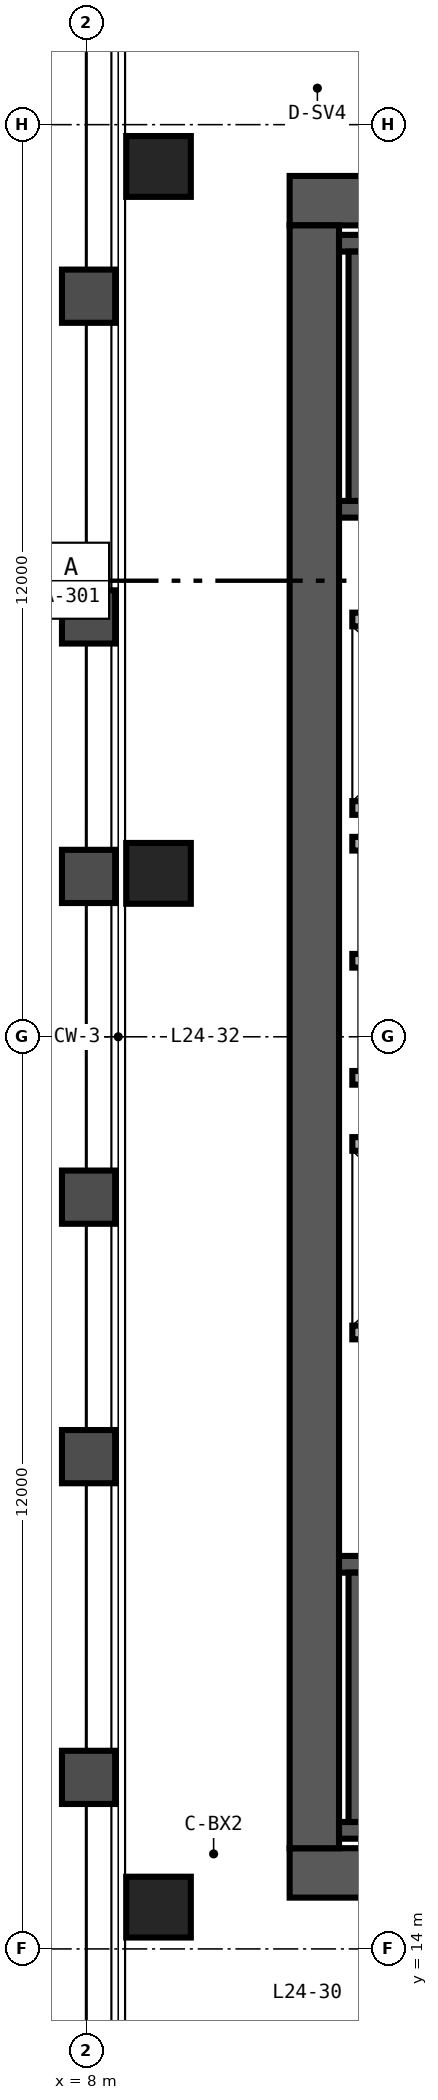
"""IFC4 building model, lengths in metres.
Left out: names, types, materials, properties, quantities, classifications, styles, units other than length and angle.
Written with IfcOpenShell. Run it as: python <this file> out.ifc"""

import sys

from ifc_helpers import new_model, si_unit, direction, frame, frame_2d, origin, origin_2d, place, context, subcontext, project, spatial, rectangle, hollow_rectangle, extrude, source, transform, mapped, element, save


model = new_model("IFC4")
c1 = context("Model", 3, precision=1e-05, world=origin(), true_north=direction((0.0, 1.0)))
c2 = subcontext(c1, "Body", "Model", "MODEL_VIEW")
j1 = project(units=[si_unit("LENGTHUNIT", "METRE"), si_unit("PLANEANGLEUNIT", "RADIAN")], contexts=[c1])
p1 = place(None, origin())
s1 = spatial("IfcSite", under=j1, at=p1, CompositionType="ELEMENT")
p2 = place(p1, origin())
s2 = spatial("IfcBuilding", under=s1, at=p2, CompositionType="ELEMENT")
p3 = place(p2, frame((0.0, 0.0, 100.8)))
s3 = spatial("IfcBuildingStorey", under=s2, at=p3, CompositionType="ELEMENT", Elevation=100.8)
p4 = place(p3, frame((10.675, 15.0, 0.0), z_axis=(0.0, 0.0, 1.0), x_axis=(1.0, 0.0, 0.0)))
e1 = element("IfcWall", 1, at=p4, inside=s3, PredefinedType="SHEAR", context=c2, shape_type="SweptSolid", body=[
    extrude(rectangle(XDim=12.65, YDim=0.65, at=frame_2d((6.325, 0.0))), origin(), (0.0, 0.0, 1.0), 3.36),
])
p5 = place(p4, frame((10.225, 0.0, 0.0)))
e2 = element("IfcOpeningElement", 2, at=p5, cuts=e1, PredefinedType="OPENING", context=c2, shape_type="SweptSolid", body=[
    extrude(rectangle(XDim=1.0, YDim=2.15, at=frame_2d((0.5, 1.075))), frame((0.0, 0.335, 0.0), z_axis=(0.0, -1.0, 0.0), x_axis=(1.0, 0.0, 0.0)), (0.0, 0.0, 1.0), 0.67),
])
p6 = place(p3, frame((10.675, 37.0, 0.0), z_axis=(0.0, 0.0, 1.0), x_axis=(1.0, 0.0, 0.0)))
e3 = element("IfcWall", 3, at=p6, inside=s3, PredefinedType="SHEAR", context=c2, shape_type="SweptSolid", body=[
    extrude(rectangle(XDim=12.65, YDim=0.65, at=frame_2d((6.325, 0.0))), origin(), (0.0, 0.0, 1.0), 3.36),
])
p7 = place(p6, frame((10.425, 0.0, 0.0)))
e4 = element("IfcOpeningElement", 4, at=p7, cuts=e3, PredefinedType="OPENING", context=c2, shape_type="SweptSolid", body=[
    extrude(rectangle(XDim=1.0, YDim=2.15, at=frame_2d((0.5, 1.075))), frame((0.0, 0.335, 0.0), z_axis=(0.0, -1.0, 0.0), x_axis=(1.0, 0.0, 0.0)), (0.0, 0.0, 1.0), 0.67),
])
p8 = place(p3, frame((11.0, 15.325, 0.0), z_axis=(0.0, 0.0, 1.0), x_axis=(0.0, 1.0, 0.0)))
e5 = element("IfcWall", 5, at=p8, inside=s3, PredefinedType="SHEAR", context=c2, shape_type="SweptSolid", body=[
    extrude(rectangle(XDim=21.35, YDim=0.65, at=frame_2d((10.675, 0.0))), origin(), (0.0, 0.0, 1.0), 3.36),
])
p9 = place(p3, frame((11.325, 15.56, 0.0), z_axis=(0.0, 0.0, 1.0), x_axis=(1.0, 0.0, 0.0)))
e6 = element("IfcWall", 6, at=p9, inside=s3, PredefinedType="SHEAR", context=c2, shape_type="SweptSolid", body=[
    extrude(rectangle(XDim=7.985, YDim=0.22, at=frame_2d((3.993, 0.0))), origin(), (0.0, 0.0, 1.0), 3.4),
])
p10 = place(p3, frame((11.325, 19.06, 0.0), z_axis=(0.0, 0.0, 1.0), x_axis=(1.0, 0.0, 0.0)))
e7 = element("IfcWall", 7, at=p10, inside=s3, PredefinedType="SHEAR", context=c2, shape_type="SweptSolid", body=[
    extrude(rectangle(XDim=7.985, YDim=0.22, at=frame_2d((3.993, 0.0))), origin(), (0.0, 0.0, 1.0), 3.4),
])
p11 = place(p10, frame((0.595, 0.0, 0.0)))
e8 = element("IfcOpeningElement", 8, at=p11, cuts=e7, PredefinedType="OPENING", context=c2, shape_type="SweptSolid", body=[
    extrude(rectangle(XDim=1.05, YDim=2.15, at=frame_2d((0.525, 1.075))), frame((0.0, 0.12, 0.0), z_axis=(0.0, -1.0, 0.0), x_axis=(1.0, 0.0, 0.0)), (0.0, 0.0, 1.0), 0.24),
])
p12 = place(p3, frame((11.56, 15.67, 0.0), z_axis=(0.0, 0.0, 1.0), x_axis=(0.0, 1.0, 0.0)))
e9 = element("IfcWall", 9, at=p12, inside=s3, PredefinedType="SHEAR", context=c2, shape_type="SweptSolid", body=[
    extrude(rectangle(XDim=3.28, YDim=0.22, at=frame_2d((1.64, 0.0))), origin(), (0.0, 0.0, 1.0), 3.4),
])
p13 = place(p3, frame((11.325, 32.94, 0.0), z_axis=(0.0, 0.0, 1.0), x_axis=(1.0, 0.0, 0.0)))
e10 = element("IfcWall", 10, at=p13, inside=s3, PredefinedType="SHEAR", context=c2, shape_type="SweptSolid", body=[
    extrude(rectangle(XDim=7.985, YDim=0.22, at=frame_2d((3.993, 0.0))), origin(), (0.0, 0.0, 1.0), 3.4),
])
p14 = place(p13, frame((0.595, 0.0, 0.0)))
e11 = element("IfcOpeningElement", 11, at=p14, cuts=e10, PredefinedType="OPENING", context=c2, shape_type="SweptSolid", body=[
    extrude(rectangle(XDim=1.05, YDim=2.15, at=frame_2d((0.525, 1.075))), frame((0.0, 0.12, 0.0), z_axis=(0.0, -1.0, 0.0), x_axis=(1.0, 0.0, 0.0)), (0.0, 0.0, 1.0), 0.24),
])
p15 = place(p3, frame((11.325, 36.44, 0.0), z_axis=(0.0, 0.0, 1.0), x_axis=(1.0, 0.0, 0.0)))
e12 = element("IfcWall", 12, at=p15, inside=s3, PredefinedType="SHEAR", context=c2, shape_type="SweptSolid", body=[
    extrude(rectangle(XDim=7.985, YDim=0.22, at=frame_2d((3.993, 0.0))), origin(), (0.0, 0.0, 1.0), 3.4),
])
p16 = place(p3, frame((11.56, 33.05, 0.0), z_axis=(0.0, 0.0, 1.0), x_axis=(0.0, 1.0, 0.0)))
e13 = element("IfcWall", 13, at=p16, inside=s3, PredefinedType="SHEAR", context=c2, shape_type="SweptSolid", body=[
    extrude(rectangle(XDim=3.28, YDim=0.22, at=frame_2d((1.64, 0.0))), origin(), (0.0, 0.0, 1.0), 3.4),
])
m1 = source(origin(), c2, "Body", "SweptSolid", [
    extrude(hollow_rectangle(XDim=0.85, YDim=0.8, WallThickness=0.032, at=origin_2d()), origin(), (0.0, 0.0, 1.0), 3.36),
])
for number, where, z_axis, x_axis in (
    (14, (8.95, 14.55, 0.0), (0.0, 0.0, 1.0), (1.0, 0.0, 0.0)),
    (15, (8.95, 28.15, 0.0), (0.0, 0.0, 1.0), (1.0, 0.0, 0.0)),
    (16, (8.95, 37.45, 0.0), (0.0, 0.0, 1.0), (1.0, 0.0, 0.0)),
):
    element("IfcColumn", number, at=place(p3, frame(where, z_axis=z_axis, x_axis=x_axis)), inside=s3, PredefinedType="COLUMN", context=c2, shape_type="MappedRepresentation", body=[
        mapped(m1, transform((0.0, 0.0, 0.0), scale=1.0)),
    ])
for number, where, z_axis, x_axis in (
    (17, (11.5, 22.11, 0.0), (0.0, 0.0, 1.0), (1.0, 0.0, 0.0)),
    (18, (11.5, 24.59, 0.0), (0.0, 0.0, 1.0), (1.0, 0.0, 0.0)),
    (19, (11.5, 29.01, 0.0), (0.0, 0.0, 1.0), (1.0, 0.0, 0.0)),
    (20, (11.5, 31.49, 0.0), (0.0, 0.0, 1.0), (1.0, 0.0, 0.0)),
):
    element("IfcWall", number, at=place(p3, frame(where, z_axis=z_axis, x_axis=x_axis)), inside=s3, PredefinedType="SOLIDWALL", context=c2, shape_type="SweptSolid", body=[
        extrude(rectangle(XDim=2.5, YDim=0.18, at=frame_2d((1.25, 0.0))), origin(), (0.0, 0.0, 1.0), 3.36),
    ])
for number, where, z_axis, x_axis in (
    (21, (11.5, 25.46, 0.0), (0.0, 0.0, 1.0), (1.0, 0.0, 0.0)),
    (22, (11.5, 27.0, 0.0), (0.0, 0.0, 1.0), (1.0, 0.0, 0.0)),
    (23, (11.5, 28.54, 0.0), (0.0, 0.0, 1.0), (1.0, 0.0, 0.0)),
):
    element("IfcWall", number, at=place(p3, frame(where, z_axis=z_axis, x_axis=x_axis)), inside=s3, PredefinedType="SOLIDWALL", context=c2, shape_type="SweptSolid", body=[
        extrude(rectangle(XDim=2.51, YDim=0.18, at=frame_2d((1.255, 0.0))), origin(), (0.0, 0.0, 1.0), 3.36),
    ])
save(model, sys.argv[1])
